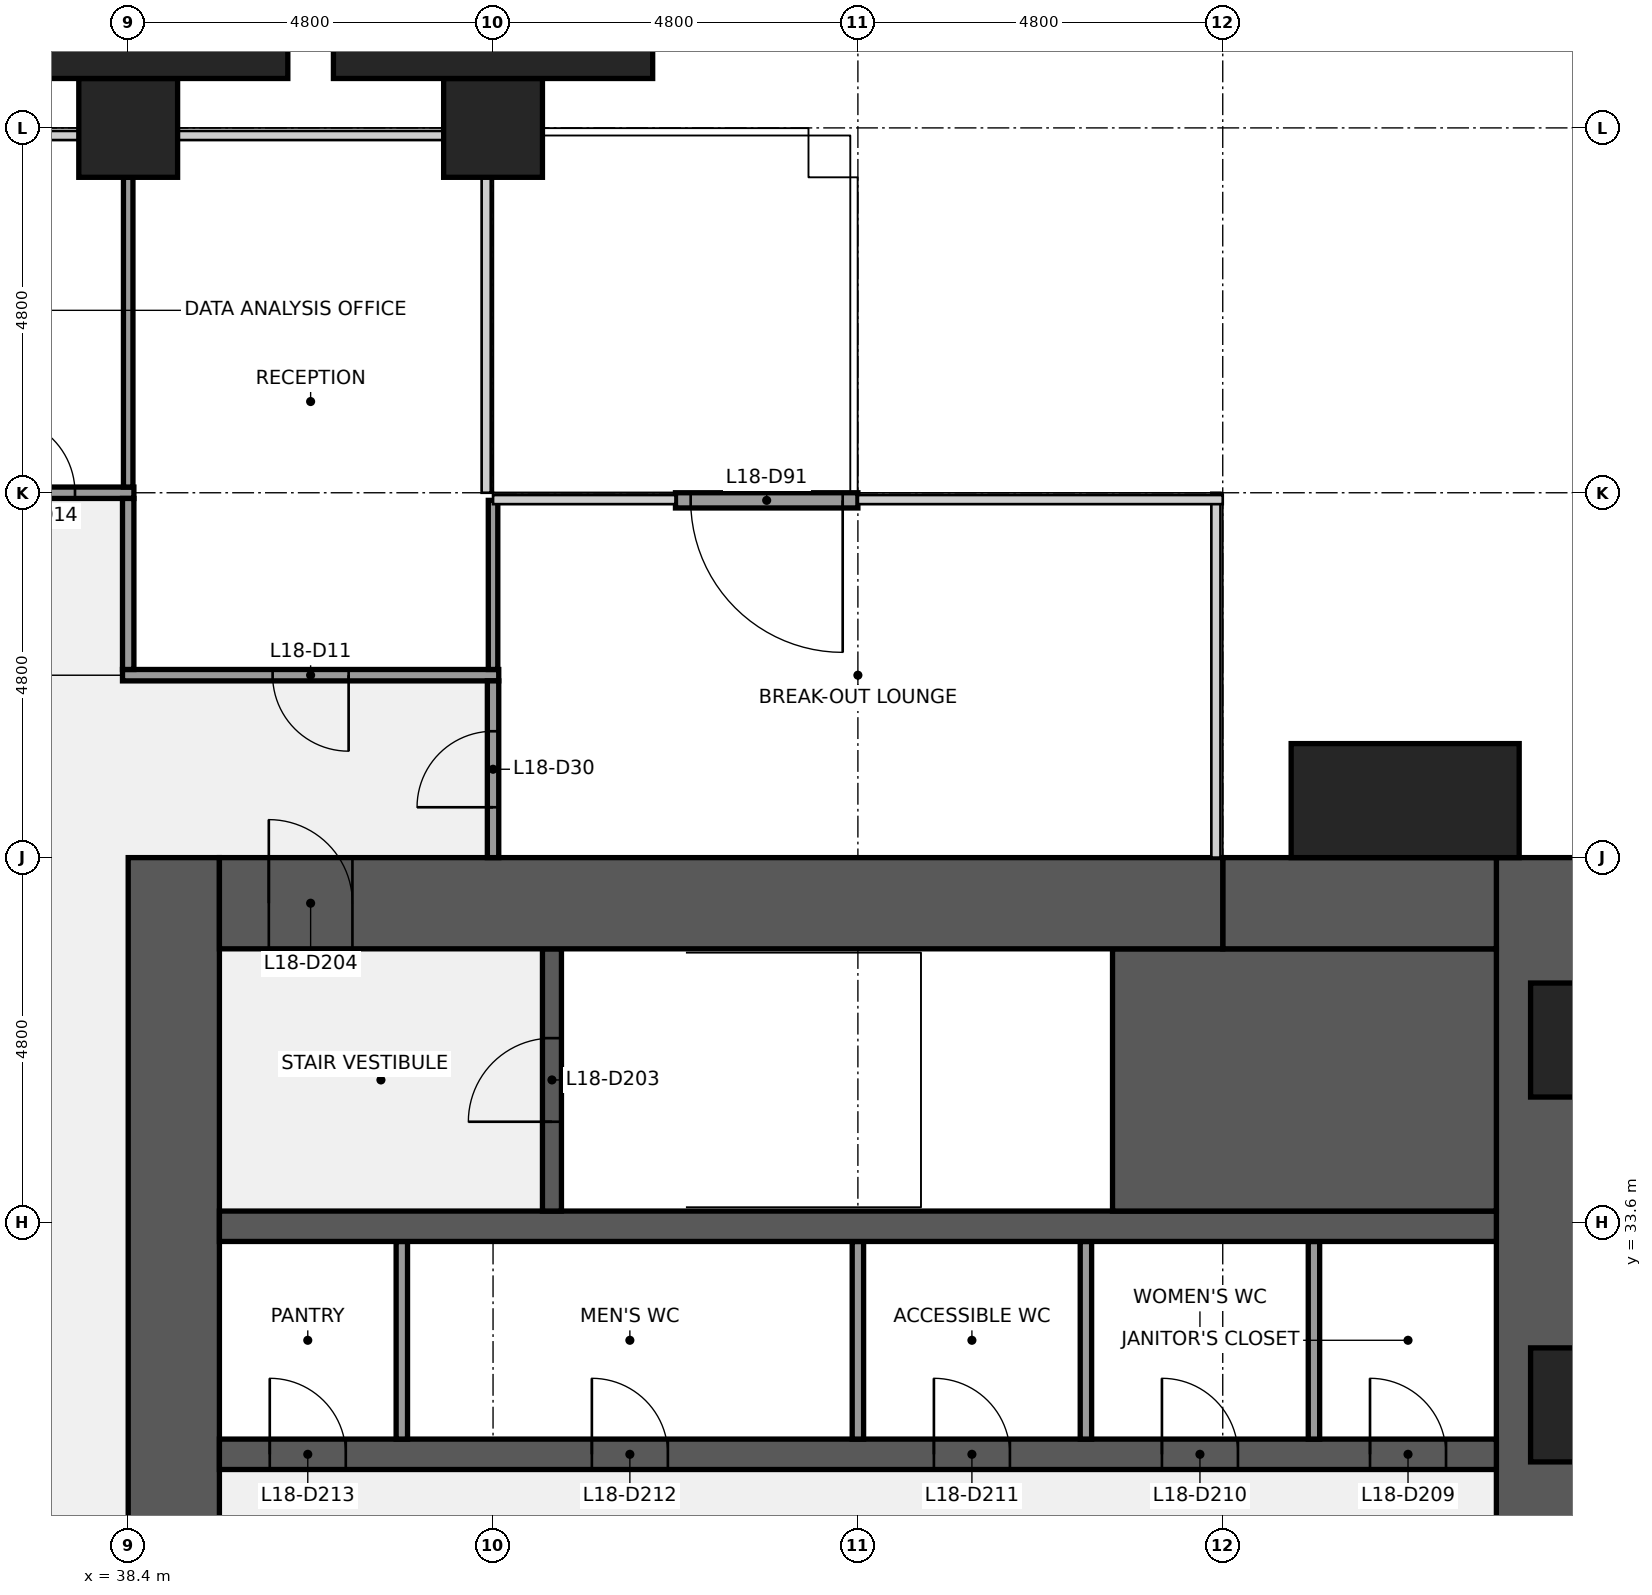
"""IFC4 building model, lengths in metres.
Left out: names, types, materials, properties, quantities, classifications, styles, units other than length and angle.
Written with IfcOpenShell. Run it as: python <this file> out.ifc"""

import sys

from ifc_helpers import new_model, si_unit, direction, frame, frame_2d, origin, origin_2d, place, context, subcontext, project, spatial, rectangle, extrude, element, fill, save


model = new_model("IFC4")
c1 = context("Model", 3, precision=1e-05, world=origin(), true_north=direction((0.0, 1.0)))
c2 = subcontext(c1, "Body", "Model", "MODEL_VIEW")
j1 = project(units=[si_unit("LENGTHUNIT", "METRE"), si_unit("PLANEANGLEUNIT", "RADIAN")], contexts=[c1])
p1 = place(None, origin())
s1 = spatial("IfcSite", under=j1, at=p1, CompositionType="ELEMENT")
p2 = place(p1, origin())
s2 = spatial("IfcBuilding", under=s1, at=p2, CompositionType="ELEMENT")
p3 = place(p2, frame((0.0, 0.0, 83.0)))
s3 = spatial("IfcBuildingStorey", under=s2, at=p3, CompositionType="ELEMENT", Elevation=83.0)
for number, where, z_axis, x_axis in (
    (1, (38.4, 48.0, 0.0), (0.0, 0.0, 1.0), (1.0, 0.0, 0.0)),
    (2, (43.2, 48.0, 0.0), (0.0, 0.0, 1.0), (1.0, 0.0, 0.0)),
):
    element("IfcColumn", number, at=place(p3, frame(where, z_axis=z_axis, x_axis=x_axis)), inside=s3, PredefinedType="COLUMN", context=c2, shape_type="SweptSolid", body=[
        extrude(rectangle(XDim=1.3, YDim=1.3, at=origin_2d()), origin(), (0.0, 0.0, 1.0), 4.0),
    ])
p4 = place(p3, frame((57.0, 38.4, 0.0), z_axis=(0.0, 0.0, 1.0), x_axis=(0.0, -1.0, 0.0)))
e3 = element("IfcWall", 3, at=p4, inside=s3, PredefinedType="SHEAR", context=c2, shape_type="SweptSolid", body=[
    extrude(rectangle(XDim=28.8, YDim=1.2, at=frame_2d((14.4, 0.0))), origin(), (0.0, 0.0, 1.0), 3.7),
])
p5 = place(p4, frame((18.45, 0.0, 0.9)))
e4 = element("IfcOpeningElement", 4, at=p5, cuts=e3, PredefinedType="OPENING", context=c2, shape_type="SweptSolid", body=[
    extrude(rectangle(XDim=1.5, YDim=1.5, at=frame_2d((0.75, 0.75))), frame((0.0, 0.61, 0.0), z_axis=(0.0, -1.0, 0.0), x_axis=(1.0, 0.0, 0.0)), (0.0, 0.0, 1.0), 1.22),
])
p6 = place(p4, frame((8.85, 0.0, 0.9)))
e5 = element("IfcOpeningElement", 5, at=p6, cuts=e3, PredefinedType="OPENING", context=c2, shape_type="SweptSolid", body=[
    extrude(rectangle(XDim=1.5, YDim=1.5, at=frame_2d((0.75, 0.75))), frame((0.0, 0.61, 0.0), z_axis=(0.0, -1.0, 0.0), x_axis=(1.0, 0.0, 0.0)), (0.0, 0.0, 1.0), 1.22),
])
p7 = place(p3, frame((39.0, 9.6, 0.0), z_axis=(0.0, 0.0, 1.0), x_axis=(0.0, 1.0, 0.0)))
e6 = element("IfcWall", 6, at=p7, inside=s3, PredefinedType="SHEAR", context=c2, shape_type="SweptSolid", body=[
    extrude(rectangle(XDim=28.8, YDim=1.2, at=frame_2d((14.4, 0.0))), origin(), (0.0, 0.0, 1.0), 3.7),
])
p8 = place(p7, frame((8.7, 0.0, 0.0)))
e7 = element("IfcOpeningElement", 7, at=p8, cuts=e6, PredefinedType="OPENING", context=c2, shape_type="SweptSolid", body=[
    extrude(rectangle(XDim=1.8, YDim=2.1, at=frame_2d((0.9, 1.05))), frame((0.0, 0.61, 0.0), z_axis=(0.0, -1.0, 0.0), x_axis=(1.0, 0.0, 0.0)), (0.0, 0.0, 1.0), 1.22),
])
p9 = place(p7, frame((18.3, 0.0, 0.0)))
e8 = element("IfcOpeningElement", 8, at=p9, cuts=e6, PredefinedType="OPENING", context=c2, shape_type="SweptSolid", body=[
    extrude(rectangle(XDim=1.8, YDim=2.1, at=frame_2d((0.9, 1.05))), frame((0.0, 0.61, 0.0), z_axis=(0.0, -1.0, 0.0), x_axis=(1.0, 0.0, 0.0)), (0.0, 0.0, 1.0), 1.22),
])
p10 = place(p3, frame((39.6, 30.55, 0.0), z_axis=(0.0, 0.0, 1.0), x_axis=(1.0, 0.0, 0.0)))
e9 = element("IfcWall", 9, at=p10, inside=s3, PredefinedType="SHEAR", context=c2, shape_type="SweptSolid", body=[
    extrude(rectangle(XDim=16.8, YDim=0.4, at=frame_2d((8.4, 0.0))), origin(), (0.0, 0.0, 1.0), 3.7),
])
p11 = place(p10, frame((15.137, 0.0, 0.0)))
e10 = element("IfcOpeningElement", 10, at=p11, cuts=e9, PredefinedType="OPENING", context=c2, shape_type="SweptSolid", body=[
    extrude(rectangle(XDim=1.0, YDim=2.1, at=frame_2d((0.5, 1.05))), frame((0.0, 0.21, 0.0), z_axis=(0.0, -1.0, 0.0), x_axis=(1.0, 0.0, 0.0)), (0.0, 0.0, 1.0), 0.42),
])
p12 = place(p10, frame((12.4, 0.0, 0.0)))
e11 = element("IfcOpeningElement", 11, at=p12, cuts=e9, PredefinedType="OPENING", context=c2, shape_type="SweptSolid", body=[
    extrude(rectangle(XDim=1.0, YDim=2.1, at=frame_2d((0.5, 1.05))), frame((0.0, 0.21, 0.0), z_axis=(0.0, -1.0, 0.0), x_axis=(1.0, 0.0, 0.0)), (0.0, 0.0, 1.0), 0.42),
])
p13 = place(p10, frame((9.4, 0.0, 0.0)))
e12 = element("IfcOpeningElement", 12, at=p13, cuts=e9, PredefinedType="OPENING", context=c2, shape_type="SweptSolid", body=[
    extrude(rectangle(XDim=1.0, YDim=2.1, at=frame_2d((0.5, 1.05))), frame((0.0, 0.21, 0.0), z_axis=(0.0, -1.0, 0.0), x_axis=(1.0, 0.0, 0.0)), (0.0, 0.0, 1.0), 0.42),
])
p14 = place(p10, frame((4.9, 0.0, 0.0)))
e13 = element("IfcOpeningElement", 13, at=p14, cuts=e9, PredefinedType="OPENING", context=c2, shape_type="SweptSolid", body=[
    extrude(rectangle(XDim=1.0, YDim=2.1, at=frame_2d((0.5, 1.05))), frame((0.0, 0.21, 0.0), z_axis=(0.0, -1.0, 0.0), x_axis=(1.0, 0.0, 0.0)), (0.0, 0.0, 1.0), 0.42),
])
p15 = place(p10, frame((0.663, 0.0, 0.0)))
e14 = element("IfcOpeningElement", 14, at=p15, cuts=e9, PredefinedType="OPENING", context=c2, shape_type="SweptSolid", body=[
    extrude(rectangle(XDim=1.0, YDim=2.1, at=frame_2d((0.5, 1.05))), frame((0.0, 0.21, 0.0), z_axis=(0.0, -1.0, 0.0), x_axis=(1.0, 0.0, 0.0)), (0.0, 0.0, 1.0), 0.42),
])
for number, where, z_axis, x_axis in (
    (15, (54.0, 30.75, 0.0), (0.0, 0.0, 1.0), (0.0, 1.0, 0.0)),
    (16, (51.0, 30.75, 0.0), (0.0, 0.0, 1.0), (0.0, 1.0, 0.0)),
    (17, (48.0, 30.75, 0.0), (0.0, 0.0, 1.0), (0.0, 1.0, 0.0)),
    (18, (42.0, 30.75, 0.0), (0.0, 0.0, 1.0), (0.0, 1.0, 0.0)),
):
    element("IfcWall", number, at=place(p3, frame(where, z_axis=z_axis, x_axis=x_axis)), inside=s3, PredefinedType="PARTITIONING", context=c2, shape_type="SweptSolid", body=[
        extrude(rectangle(XDim=2.6, YDim=0.15, at=frame_2d((1.3, 0.0))), origin(), (0.0, 0.0, 1.0), 3.7),
    ])
p16 = place(p3, frame((39.6, 33.55, 0.0), z_axis=(0.0, 0.0, 1.0), x_axis=(1.0, 0.0, 0.0)))
e19 = element("IfcWall", 19, at=p16, inside=s3, PredefinedType="SHEAR", context=c2, shape_type="SweptSolid", body=[
    extrude(rectangle(XDim=16.8, YDim=0.4, at=frame_2d((8.4, 0.0))), origin(), (0.0, 0.0, 1.0), 3.7),
])
p17 = place(p3, frame((51.35, 35.475, 0.0), z_axis=(0.0, 0.0, 1.0), x_axis=(1.0, 0.0, 0.0)))
e20 = element("IfcWall", 20, at=p17, inside=s3, PredefinedType="SHEAR", context=c2, shape_type="SweptSolid", body=[
    extrude(rectangle(XDim=5.05, YDim=3.45, at=frame_2d((2.525, 0.0))), origin(), (0.0, 0.0, 1.0), 3.7),
])
p18 = place(p3, frame((43.975, 33.75, 0.0), z_axis=(0.0, 0.0, 1.0), x_axis=(0.0, 1.0, 0.0)))
e21 = element("IfcWall", 21, at=p18, inside=s3, PredefinedType="SHEAR", context=c2, shape_type="SweptSolid", body=[
    extrude(rectangle(XDim=3.45, YDim=0.25, at=frame_2d((1.725, 0.0))), origin(), (0.0, 0.0, 1.0), 3.7),
])
p19 = place(p18, frame((1.175, 0.0, 0.0)))
e22 = element("IfcOpeningElement", 22, at=p19, cuts=e21, PredefinedType="OPENING", context=c2, shape_type="SweptSolid", body=[
    extrude(rectangle(XDim=1.1, YDim=2.1, at=frame_2d((0.55, 1.05))), frame((0.0, 0.135, 0.0), z_axis=(0.0, -1.0, 0.0), x_axis=(1.0, 0.0, 0.0)), (0.0, 0.0, 1.0), 0.27),
])
p20 = place(p3, frame((52.8, 37.8, 0.0), z_axis=(0.0, 0.0, 1.0), x_axis=(1.0, 0.0, 0.0)))
e23 = element("IfcWall", 23, at=p20, inside=s3, PredefinedType="SHEAR", context=c2, shape_type="SweptSolid", body=[
    extrude(rectangle(XDim=3.6, YDim=1.2, at=frame_2d((1.8, 0.0))), origin(), (0.0, 0.0, 1.0), 3.7),
])
p21 = place(p3, frame((39.6, 37.8, 0.0), z_axis=(0.0, 0.0, 1.0), x_axis=(1.0, 0.0, 0.0)))
e24 = element("IfcWall", 24, at=p21, inside=s3, PredefinedType="SHEAR", context=c2, shape_type="SweptSolid", body=[
    extrude(rectangle(XDim=13.2, YDim=1.2, at=frame_2d((6.6, 0.0))), origin(), (0.0, 0.0, 1.0), 3.7),
])
p22 = place(p21, frame((0.65, 0.0, 0.0)))
e25 = element("IfcOpeningElement", 25, at=p22, cuts=e24, PredefinedType="OPENING", context=c2, shape_type="SweptSolid", body=[
    extrude(rectangle(XDim=1.1, YDim=2.1, at=frame_2d((0.55, 1.05))), frame((0.0, 0.61, 0.0), z_axis=(0.0, -1.0, 0.0), x_axis=(1.0, 0.0, 0.0)), (0.0, 0.0, 1.0), 1.22),
])
p23 = place(p3, frame((38.325, 40.8, 0.0), z_axis=(0.0, 0.0, 1.0), x_axis=(1.0, 0.0, 0.0)))
e26 = element("IfcWall", 26, at=p23, inside=s3, PredefinedType="PARTITIONING", context=c2, shape_type="SweptSolid", body=[
    extrude(rectangle(XDim=4.95, YDim=0.15, at=frame_2d((2.475, 0.0))), origin(), (0.0, 0.0, 1.0), 2.709),
])
p24 = place(p23, frame((1.975, 0.0, 0.0)))
e27 = element("IfcOpeningElement", 27, at=p24, cuts=e26, PredefinedType="OPENING", context=c2, shape_type="SweptSolid", body=[
    extrude(rectangle(XDim=1.0, YDim=2.1, at=frame_2d((0.5, 1.05))), frame((0.0, 0.085, 0.0), z_axis=(0.0, -1.0, 0.0), x_axis=(1.0, 0.0, 0.0)), (0.0, 0.0, 1.0), 0.17),
])
p25 = place(p3, frame((19.125, 43.2, 0.0), z_axis=(0.0, 0.0, 1.0), x_axis=(1.0, 0.0, 0.0)))
e28 = element("IfcWall", 28, at=p25, inside=s3, PredefinedType="PARTITIONING", context=c2, shape_type="SweptSolid", body=[
    extrude(rectangle(XDim=19.35, YDim=0.15, at=frame_2d((9.675, 0.0))), origin(), (0.0, 0.0, 1.0), 2.709),
])
p26 = place(p25, frame((5.575, 0.0, 0.0)))
e29 = element("IfcOpeningElement", 29, at=p26, cuts=e28, PredefinedType="OPENING", context=c2, shape_type="SweptSolid", body=[
    extrude(rectangle(XDim=1.0, YDim=2.1, at=frame_2d((0.5, 1.05))), frame((0.0, 0.085, 0.0), z_axis=(0.0, -1.0, 0.0), x_axis=(1.0, 0.0, 0.0)), (0.0, 0.0, 1.0), 0.17),
])
p27 = place(p25, frame((13.975, 0.0, 0.0)))
e30 = element("IfcOpeningElement", 30, at=p27, cuts=e28, PredefinedType="OPENING", context=c2, shape_type="SweptSolid", body=[
    extrude(rectangle(XDim=1.0, YDim=2.1, at=frame_2d((0.5, 1.05))), frame((0.0, 0.085, 0.0), z_axis=(0.0, -1.0, 0.0), x_axis=(1.0, 0.0, 0.0)), (0.0, 0.0, 1.0), 0.17),
])
p28 = place(p25, frame((17.575, 0.0, 0.0)))
e31 = element("IfcOpeningElement", 31, at=p28, cuts=e28, PredefinedType="OPENING", context=c2, shape_type="SweptSolid", body=[
    extrude(rectangle(XDim=1.0, YDim=2.1, at=frame_2d((0.5, 1.05))), frame((0.0, 0.085, 0.0), z_axis=(0.0, -1.0, 0.0), x_axis=(1.0, 0.0, 0.0)), (0.0, 0.0, 1.0), 0.17),
])
p29 = place(p3, frame((38.4, 43.275, 0.0), z_axis=(0.0, 0.0, 1.0), x_axis=(0.0, 1.0, 0.0)))
e32 = element("IfcWall", 32, at=p29, inside=s3, PredefinedType="PARTITIONING", context=c2, shape_type="SweptSolid", body=[
    extrude(rectangle(XDim=4.075, YDim=0.125, at=frame_2d((2.038, 0.0))), origin(), (0.0, 0.0, 1.0), 2.709),
])
p30 = place(p3, frame((38.4, 40.875, 0.0), z_axis=(0.0, 0.0, 1.0), x_axis=(0.0, 1.0, 0.0)))
e33 = element("IfcWall", 33, at=p30, inside=s3, PredefinedType="PARTITIONING", context=c2, shape_type="SweptSolid", body=[
    extrude(rectangle(XDim=2.25, YDim=0.15, at=frame_2d((1.125, 0.0))), origin(), (0.0, 0.0, 1.0), 2.709),
])
p31 = place(p3, frame((43.2, 40.875, 0.0), z_axis=(0.0, 0.0, 1.0), x_axis=(0.0, 1.0, 0.0)))
e34 = element("IfcWall", 34, at=p31, inside=s3, PredefinedType="PARTITIONING", context=c2, shape_type="SweptSolid", body=[
    extrude(rectangle(XDim=2.225, YDim=0.125, at=frame_2d((1.113, 0.0))), origin(), (0.0, 0.0, 1.0), 2.709),
])
p32 = place(p3, frame((43.2, 38.4, 0.0), z_axis=(0.0, 0.0, 1.0), x_axis=(0.0, 1.0, 0.0)))
e35 = element("IfcWall", 35, at=p32, inside=s3, PredefinedType="PARTITIONING", context=c2, shape_type="SweptSolid", body=[
    extrude(rectangle(XDim=2.325, YDim=0.15, at=frame_2d((1.163, 0.0))), origin(), (0.0, 0.0, 1.0), 2.709),
])
p33 = place(p32, frame((0.663, 0.0, 0.0)))
e36 = element("IfcOpeningElement", 36, at=p33, cuts=e35, PredefinedType="OPENING", context=c2, shape_type="SweptSolid", body=[
    extrude(rectangle(XDim=1.0, YDim=2.1, at=frame_2d((0.5, 1.05))), frame((0.0, 0.085, 0.0), z_axis=(0.0, -1.0, 0.0), x_axis=(1.0, 0.0, 0.0)), (0.0, 0.0, 1.0), 0.17),
])
p34 = place(p3, frame((55.2, 39.15, 0.0), z_axis=(0.0, 0.0, 1.0), x_axis=(1.0, 0.0, 0.0)))
e37 = element("IfcColumn", 37, at=p34, inside=s3, PredefinedType="PILASTER", context=c2, shape_type="SweptSolid", body=[
    extrude(rectangle(XDim=3.0, YDim=1.5, at=origin_2d()), origin(), (0.0, 0.0, 1.0), 4.0),
])
p35 = place(p3, frame((48.0, 43.1, 0.0), z_axis=(0.0, 0.0, 1.0), x_axis=(-1.0, 0.0, 0.0)))
e38 = element("IfcWall", 38, at=p35, inside=s3, PredefinedType="SOLIDWALL", context=c2, shape_type="SweptSolid", body=[
    extrude(rectangle(XDim=2.4, YDim=0.2, at=frame_2d((1.2, 0.0))), origin(), (0.0, 0.0, 1.0), 3.7),
])
p36 = place(p35, frame((0.2, 0.0, 0.0)))
e39 = element("IfcOpeningElement", 39, at=p36, cuts=e38, PredefinedType="OPENING", context=c2, shape_type="SweptSolid", body=[
    extrude(rectangle(XDim=2.0, YDim=2.1, at=frame_2d((1.0, 1.05))), frame((0.0, 0.11, 0.0), z_axis=(0.0, -1.0, 0.0), x_axis=(1.0, 0.0, 0.0)), (0.0, 0.0, 1.0), 0.22),
])
for number, where, z_axis, x_axis in (
    (40, (38.4, 49.075, 0.0), (0.0, 0.0, 1.0), (1.0, 0.0, 0.0)),
    (41, (43.2, 49.075, 0.0), (0.0, 0.0, 1.0), (1.0, 0.0, 0.0)),
):
    element("IfcColumn", number, at=place(p3, frame(where, z_axis=z_axis, x_axis=x_axis)), inside=s3, PredefinedType="PILASTER", context=c2, shape_type="SweptSolid", body=[
        extrude(rectangle(XDim=4.2, YDim=0.85, at=origin_2d()), origin(), (0.0, 0.0, 1.0), 4.0),
    ])
p37 = place(p19, origin())
e42 = element("IfcDoor", 42, at=p37, inside=s3, OperationType="SINGLE_SWING_LEFT", PredefinedType="DOOR", context=c2, shape_type="SweptSolid", body=[
    extrude(rectangle(XDim=1.1, YDim=2.1, at=frame_2d((0.55, 1.05))), frame((0.0, 0.025, 0.0), z_axis=(0.0, -1.0, 0.0), x_axis=(1.0, 0.0, 0.0)), (0.0, 0.0, 1.0), 0.05),
])
fill(e22, e42)
p38 = place(p22, origin())
e43 = element("IfcDoor", 43, at=p38, inside=s3, OperationType="SINGLE_SWING_LEFT", PredefinedType="DOOR", context=c2, shape_type="SweptSolid", body=[
    extrude(rectangle(XDim=1.1, YDim=2.1, at=frame_2d((0.55, 1.05))), frame((0.0, 0.025, 0.0), z_axis=(0.0, -1.0, 0.0), x_axis=(1.0, 0.0, 0.0)), (0.0, 0.0, 1.0), 0.05),
])
fill(e25, e43)
p39 = place(p11, origin())
e44 = element("IfcDoor", 44, at=p39, inside=s3, OperationType="SINGLE_SWING_LEFT", PredefinedType="DOOR", context=c2, shape_type="SweptSolid", body=[
    extrude(rectangle(XDim=1.0, YDim=2.1, at=frame_2d((0.5, 1.05))), frame((0.0, 0.025, 0.0), z_axis=(0.0, -1.0, 0.0), x_axis=(1.0, 0.0, 0.0)), (0.0, 0.0, 1.0), 0.05),
])
fill(e10, e44)
p40 = place(p12, origin())
e45 = element("IfcDoor", 45, at=p40, inside=s3, OperationType="SINGLE_SWING_LEFT", PredefinedType="DOOR", context=c2, shape_type="SweptSolid", body=[
    extrude(rectangle(XDim=1.0, YDim=2.1, at=frame_2d((0.5, 1.05))), frame((0.0, 0.025, 0.0), z_axis=(0.0, -1.0, 0.0), x_axis=(1.0, 0.0, 0.0)), (0.0, 0.0, 1.0), 0.05),
])
fill(e11, e45)
p41 = place(p13, origin())
e46 = element("IfcDoor", 46, at=p41, inside=s3, OperationType="SINGLE_SWING_LEFT", PredefinedType="DOOR", context=c2, shape_type="SweptSolid", body=[
    extrude(rectangle(XDim=1.0, YDim=2.1, at=frame_2d((0.5, 1.05))), frame((0.0, 0.025, 0.0), z_axis=(0.0, -1.0, 0.0), x_axis=(1.0, 0.0, 0.0)), (0.0, 0.0, 1.0), 0.05),
])
fill(e12, e46)
p42 = place(p14, origin())
e47 = element("IfcDoor", 47, at=p42, inside=s3, OperationType="SINGLE_SWING_LEFT", PredefinedType="DOOR", context=c2, shape_type="SweptSolid", body=[
    extrude(rectangle(XDim=1.0, YDim=2.1, at=frame_2d((0.5, 1.05))), frame((0.0, 0.025, 0.0), z_axis=(0.0, -1.0, 0.0), x_axis=(1.0, 0.0, 0.0)), (0.0, 0.0, 1.0), 0.05),
])
fill(e13, e47)
p43 = place(p15, origin())
e48 = element("IfcDoor", 48, at=p43, inside=s3, OperationType="SINGLE_SWING_LEFT", PredefinedType="DOOR", context=c2, shape_type="SweptSolid", body=[
    extrude(rectangle(XDim=1.0, YDim=2.1, at=frame_2d((0.5, 1.05))), frame((0.0, 0.025, 0.0), z_axis=(0.0, -1.0, 0.0), x_axis=(1.0, 0.0, 0.0)), (0.0, 0.0, 1.0), 0.05),
])
fill(e14, e48)
p44 = place(p24, origin())
e49 = element("IfcDoor", 49, at=p44, inside=s3, OperationType="SINGLE_SWING_RIGHT", PredefinedType="DOOR", context=c2, shape_type="SweptSolid", body=[
    extrude(rectangle(XDim=1.0, YDim=2.1, at=frame_2d((0.5, 1.05))), frame((0.0, 0.025, 0.0), z_axis=(0.0, -1.0, 0.0), x_axis=(1.0, 0.0, 0.0)), (0.0, 0.0, 1.0), 0.05),
])
fill(e27, e49)
p45 = place(p28, origin())
e50 = element("IfcDoor", 50, at=p45, inside=s3, OperationType="SINGLE_SWING_LEFT", PredefinedType="DOOR", context=c2, shape_type="SweptSolid", body=[
    extrude(rectangle(XDim=1.0, YDim=2.1, at=frame_2d((0.5, 1.05))), frame((0.0, 0.025, 0.0), z_axis=(0.0, -1.0, 0.0), x_axis=(1.0, 0.0, 0.0)), (0.0, 0.0, 1.0), 0.05),
])
fill(e31, e50)
p46 = place(p33, origin())
e51 = element("IfcDoor", 51, at=p46, inside=s3, OperationType="SINGLE_SWING_LEFT", PredefinedType="DOOR", context=c2, shape_type="SweptSolid", body=[
    extrude(rectangle(XDim=1.0, YDim=2.1, at=frame_2d((0.5, 1.05))), frame((0.0, 0.025, 0.0), z_axis=(0.0, -1.0, 0.0), x_axis=(1.0, 0.0, 0.0)), (0.0, 0.0, 1.0), 0.05),
])
fill(e36, e51)
p47 = place(p36, origin())
e52 = element("IfcDoor", 52, at=p47, inside=s3, OperationType="SINGLE_SWING_LEFT", PredefinedType="DOOR", context=c2, shape_type="SweptSolid", body=[
    extrude(rectangle(XDim=2.0, YDim=2.1, at=frame_2d((1.0, 1.05))), frame((0.0, 0.025, 0.0), z_axis=(0.0, -1.0, 0.0), x_axis=(1.0, 0.0, 0.0)), (0.0, 0.0, 1.0), 0.05),
])
fill(e39, e52)
save(model, sys.argv[1])
